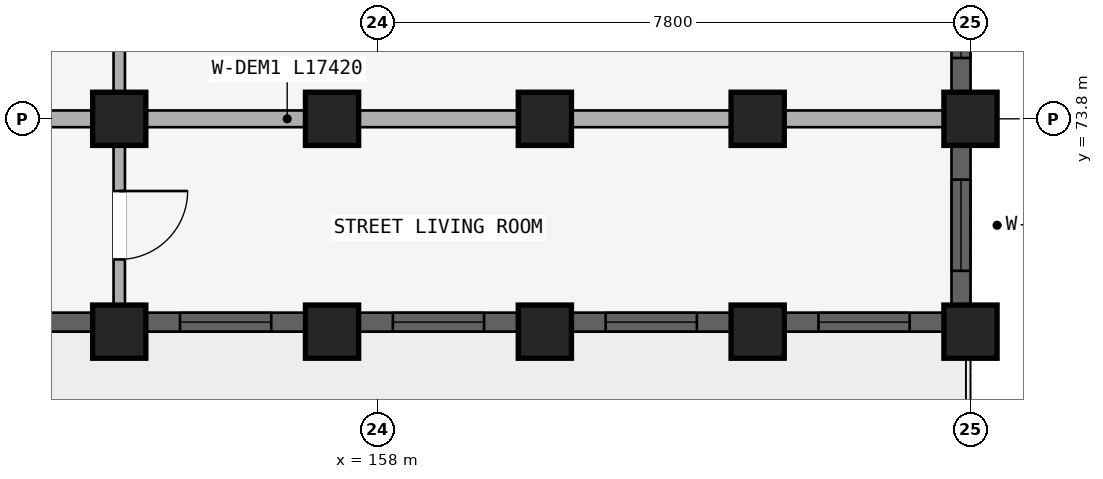
"""IFC4 building model, lengths in metres.
Left out: names, types, materials, properties, quantities, classifications, styles, units other than length and angle.
Written with IfcOpenShell. Run it as: python <this file> out.ifc"""

import sys

from ifc_helpers import new_model, si_unit, direction, frame, frame_2d, origin, origin_2d, place, context, subcontext, project, spatial, rectangle, extrude, element, fill, save


model = new_model("IFC4")
c1 = context("Model", 3, precision=1e-05, world=origin(), true_north=direction((0.0, 1.0)))
c2 = subcontext(c1, "Body", "Model", "MODEL_VIEW")
j1 = project(units=[si_unit("LENGTHUNIT", "METRE"), si_unit("PLANEANGLEUNIT", "RADIAN")], contexts=[c1])
p1 = place(None, origin())
s1 = spatial("IfcSite", under=j1, at=p1, CompositionType="ELEMENT")
p2 = place(p1, origin())
s2 = spatial("IfcBuilding", under=s1, at=p2, CompositionType="ELEMENT")
p3 = place(p2, frame((0.0, 0.0, 27.6)))
s3 = spatial("IfcBuildingStorey", under=s2, at=p3, CompositionType="ELEMENT", Elevation=27.6)
for number, where, z_axis, x_axis in (
    (1, (154.6, 73.8, 0.0), (0.0, 0.0, 1.0), (1.0, 0.0, 0.0)),
    (2, (157.4, 73.8, 0.0), (0.0, 0.0, 1.0), (1.0, 0.0, 0.0)),
    (3, (160.2, 73.8, 0.0), (0.0, 0.0, 1.0), (1.0, 0.0, 0.0)),
    (4, (163.0, 73.8, 0.0), (0.0, 0.0, 1.0), (1.0, 0.0, 0.0)),
):
    element("IfcColumn", number, at=place(p3, frame(where, z_axis=z_axis, x_axis=x_axis)), inside=s3, PredefinedType="COLUMN", context=c2, shape_type="SweptSolid", body=[
        extrude(rectangle(XDim=0.7, YDim=0.7, at=origin_2d()), origin(), (0.0, 0.0, 1.0), 2.93),
    ])
p4 = place(p3, frame((165.8, 73.8, 0.0), z_axis=(0.0, 0.0, 1.0), x_axis=(1.0, 0.0, 0.0)))
e5 = element("IfcColumn", 5, at=p4, inside=s3, PredefinedType="COLUMN", context=c2, shape_type="SweptSolid", body=[
    extrude(rectangle(XDim=0.7, YDim=0.7, at=origin_2d()), origin(), (0.0, 0.0, 1.0), 2.97),
])
for number, where, z_axis, x_axis in (
    (6, (154.6, 71.0, 0.0), (0.0, 0.0, 1.0), (1.0, 0.0, 0.0)),
    (7, (157.4, 71.0, 0.0), (0.0, 0.0, 1.0), (1.0, 0.0, 0.0)),
    (8, (160.2, 71.0, 0.0), (0.0, 0.0, 1.0), (1.0, 0.0, 0.0)),
    (9, (163.0, 71.0, 0.0), (0.0, 0.0, 1.0), (1.0, 0.0, 0.0)),
):
    element("IfcColumn", number, at=place(p3, frame(where, z_axis=z_axis, x_axis=x_axis)), inside=s3, PredefinedType="COLUMN", context=c2, shape_type="SweptSolid", body=[
        extrude(rectangle(XDim=0.7, YDim=0.7, at=origin_2d()), origin(), (0.0, 0.0, 1.0), 2.93),
    ])
p5 = place(p3, frame((165.8, 71.0, 0.0), z_axis=(0.0, 0.0, 1.0), x_axis=(1.0, 0.0, 0.0)))
e10 = element("IfcColumn", 10, at=p5, inside=s3, PredefinedType="COLUMN", context=c2, shape_type="SweptSolid", body=[
    extrude(rectangle(XDim=0.7, YDim=0.7, at=origin_2d()), origin(), (0.0, 0.0, 1.0), 2.97),
])
p6 = place(p3, frame((154.6, 76.52, 0.0), z_axis=(0.0, 0.0, 1.0), x_axis=(0.0, -1.0, 0.0)))
e11 = element("IfcWall", 11, at=p6, inside=s3, PredefinedType="PLUMBINGWALL", context=c2, shape_type="SweptSolid", body=[
    extrude(rectangle(XDim=2.64, YDim=0.15, at=frame_2d((1.32, 0.0))), origin(), (0.0, 0.0, 1.0), 2.372),
])
p7 = place(p6, frame((0.92, 0.0, 0.0)))
e12 = element("IfcOpeningElement", 12, at=p7, cuts=e11, PredefinedType="OPENING", context=c2, shape_type="SweptSolid", body=[
    extrude(rectangle(XDim=0.8, YDim=2.1, at=frame_2d((0.4, 1.05))), frame((0.0, 0.085, 0.0), z_axis=(0.0, -1.0, 0.0), x_axis=(1.0, 0.0, 0.0)), (0.0, 0.0, 1.0), 0.17),
])
p8 = place(p3, frame((154.6, 73.72, 0.0), z_axis=(0.0, 0.0, 1.0), x_axis=(0.0, -1.0, 0.0)))
e13 = element("IfcWall", 13, at=p8, inside=s3, PredefinedType="PLUMBINGWALL", context=c2, shape_type="SweptSolid", body=[
    extrude(rectangle(XDim=2.64, YDim=0.15, at=frame_2d((1.32, 0.0))), origin(), (0.0, 0.0, 1.0), 2.372),
])
p9 = place(p8, frame((0.87, 0.0, 0.0)))
e14 = element("IfcOpeningElement", 14, at=p9, cuts=e13, PredefinedType="OPENING", context=c2, shape_type="SweptSolid", body=[
    extrude(rectangle(XDim=0.9, YDim=2.1, at=frame_2d((0.45, 1.05))), frame((0.0, 0.085, 0.0), z_axis=(0.0, -1.0, 0.0), x_axis=(1.0, 0.0, 0.0)), (0.0, 0.0, 1.0), 0.17),
])
p10 = place(p3, frame((148.1, 73.8, 0.0), z_axis=(0.0, 0.0, 1.0), x_axis=(1.0, 0.0, 0.0)))
e15 = element("IfcWall", 15, at=p10, inside=s3, PredefinedType="STANDARD", context=c2, shape_type="SweptSolid", body=[
    extrude(rectangle(XDim=17.42, YDim=0.22, at=frame_2d((8.71, 0.0))), origin(), (0.0, 0.0, 1.0), 2.372),
])
p11 = place(p3, frame((165.675, 76.247, 0.0), z_axis=(0.0, 0.0, 1.0), x_axis=(0.0, -1.0, 0.0)))
e16 = element("IfcWall", 16, at=p11, inside=s3, PredefinedType="STANDARD", context=c2, shape_type="SweptSolid", body=[
    extrude(rectangle(XDim=2.093, YDim=0.25, at=frame_2d((1.046, 0.0))), origin(), (0.0, 0.0, 1.0), 2.48),
])
p12 = place(p11, frame((0.447, 0.0, 0.78)))
e17 = element("IfcOpeningElement", 17, at=p12, cuts=e16, PredefinedType="OPENING", context=c2, shape_type="SweptSolid", body=[
    extrude(rectangle(XDim=1.2, YDim=1.5, at=frame_2d((0.6, 0.75))), frame((0.0, 0.135, 0.0), z_axis=(0.0, -1.0, 0.0), x_axis=(1.0, 0.0, 0.0)), (0.0, 0.0, 1.0), 0.27),
])
p13 = place(p3, frame((165.675, 73.447, 0.0), z_axis=(0.0, 0.0, 1.0), x_axis=(0.0, -1.0, 0.0)))
e18 = element("IfcWall", 18, at=p13, inside=s3, PredefinedType="STANDARD", context=c2, shape_type="SweptSolid", body=[
    extrude(rectangle(XDim=2.093, YDim=0.25, at=frame_2d((1.046, 0.0))), origin(), (0.0, 0.0, 1.0), 2.48),
])
p14 = place(p13, frame((0.447, 0.0, 0.78)))
e19 = element("IfcOpeningElement", 19, at=p14, cuts=e18, PredefinedType="OPENING", context=c2, shape_type="SweptSolid", body=[
    extrude(rectangle(XDim=1.2, YDim=1.5, at=frame_2d((0.6, 0.75))), frame((0.0, 0.135, 0.0), z_axis=(0.0, -1.0, 0.0), x_axis=(1.0, 0.0, 0.0)), (0.0, 0.0, 1.0), 0.27),
])
p15 = place(p3, frame((148.229, 71.125, 0.0), z_axis=(0.0, 0.0, 1.0), x_axis=(1.0, 0.0, 0.0)))
e20 = element("IfcWall", 20, at=p15, inside=s3, PredefinedType="STANDARD", context=c2, shape_type="SweptSolid", body=[
    extrude(rectangle(XDim=6.018, YDim=0.25, at=frame_2d((3.009, 0.0))), origin(), (0.0, 0.0, 1.0), 2.372),
])
p16 = place(p15, frame((3.854, 0.0, 0.522)))
e21 = element("IfcOpeningElement", 21, at=p16, cuts=e20, PredefinedType="OPENING", context=c2, shape_type="SweptSolid", body=[
    extrude(rectangle(XDim=1.2, YDim=1.5, at=frame_2d((0.6, 0.75))), frame((0.0, 0.135, 0.0), z_axis=(0.0, -1.0, 0.0), x_axis=(1.0, 0.0, 0.0)), (0.0, 0.0, 1.0), 0.27),
])
p17 = place(p15, frame((1.476, 0.0, 0.0)))
e22 = element("IfcOpeningElement", 22, at=p17, cuts=e20, PredefinedType="OPENING", context=c2, shape_type="SweptSolid", body=[
    extrude(rectangle(XDim=1.26, YDim=2.15, at=frame_2d((0.63, 1.075))), frame((0.0, 0.135, 0.0), z_axis=(0.0, -1.0, 0.0), x_axis=(1.0, 0.0, 0.0)), (0.0, 0.0, 1.0), 0.27),
])
p18 = place(p3, frame((154.954, 71.125, 0.0), z_axis=(0.0, 0.0, 1.0), x_axis=(1.0, 0.0, 0.0)))
e23 = element("IfcWall", 23, at=p18, inside=s3, PredefinedType="STANDARD", context=c2, shape_type="SweptSolid", body=[
    extrude(rectangle(XDim=2.093, YDim=0.25, at=frame_2d((1.046, 0.0))), origin(), (0.0, 0.0, 1.0), 2.372),
])
p19 = place(p18, frame((0.447, 0.0, 0.672)))
e24 = element("IfcOpeningElement", 24, at=p19, cuts=e23, PredefinedType="OPENING", context=c2, shape_type="SweptSolid", body=[
    extrude(rectangle(XDim=1.2, YDim=1.5, at=frame_2d((0.6, 0.75))), frame((0.0, 0.135, 0.0), z_axis=(0.0, -1.0, 0.0), x_axis=(1.0, 0.0, 0.0)), (0.0, 0.0, 1.0), 0.27),
])
p20 = place(p3, frame((157.753, 71.125, 0.0), z_axis=(0.0, 0.0, 1.0), x_axis=(1.0, 0.0, 0.0)))
e25 = element("IfcWall", 25, at=p20, inside=s3, PredefinedType="STANDARD", context=c2, shape_type="SweptSolid", body=[
    extrude(rectangle(XDim=2.093, YDim=0.25, at=frame_2d((1.046, 0.0))), origin(), (0.0, 0.0, 1.0), 2.372),
])
p21 = place(p20, frame((0.447, 0.0, 0.672)))
e26 = element("IfcOpeningElement", 26, at=p21, cuts=e25, PredefinedType="OPENING", context=c2, shape_type="SweptSolid", body=[
    extrude(rectangle(XDim=1.2, YDim=1.5, at=frame_2d((0.6, 0.75))), frame((0.0, 0.135, 0.0), z_axis=(0.0, -1.0, 0.0), x_axis=(1.0, 0.0, 0.0)), (0.0, 0.0, 1.0), 0.27),
])
p22 = place(p3, frame((160.553, 71.125, 0.0), z_axis=(0.0, 0.0, 1.0), x_axis=(1.0, 0.0, 0.0)))
e27 = element("IfcWall", 27, at=p22, inside=s3, PredefinedType="STANDARD", context=c2, shape_type="SweptSolid", body=[
    extrude(rectangle(XDim=2.093, YDim=0.25, at=frame_2d((1.046, 0.0))), origin(), (0.0, 0.0, 1.0), 2.372),
])
p23 = place(p22, frame((0.447, 0.0, 0.672)))
e28 = element("IfcOpeningElement", 28, at=p23, cuts=e27, PredefinedType="OPENING", context=c2, shape_type="SweptSolid", body=[
    extrude(rectangle(XDim=1.2, YDim=1.5, at=frame_2d((0.6, 0.75))), frame((0.0, 0.135, 0.0), z_axis=(0.0, -1.0, 0.0), x_axis=(1.0, 0.0, 0.0)), (0.0, 0.0, 1.0), 0.27),
])
p24 = place(p3, frame((163.354, 71.125, 0.0), z_axis=(0.0, 0.0, 1.0), x_axis=(1.0, 0.0, 0.0)))
e29 = element("IfcWall", 29, at=p24, inside=s3, PredefinedType="STANDARD", context=c2, shape_type="SweptSolid", body=[
    extrude(rectangle(XDim=2.093, YDim=0.25, at=frame_2d((1.046, 0.0))), origin(), (0.0, 0.0, 1.0), 2.412),
])
p25 = place(p24, frame((0.447, 0.0, 0.712)))
e30 = element("IfcOpeningElement", 30, at=p25, cuts=e29, PredefinedType="OPENING", context=c2, shape_type="SweptSolid", body=[
    extrude(rectangle(XDim=1.2, YDim=1.5, at=frame_2d((0.6, 0.75))), frame((0.0, 0.135, 0.0), z_axis=(0.0, -1.0, 0.0), x_axis=(1.0, 0.0, 0.0)), (0.0, 0.0, 1.0), 0.27),
])
p26 = place(p12, origin())
e31 = element("IfcWindow", 31, at=p26, inside=s3, PartitioningType="SINGLE_PANEL", PredefinedType="WINDOW", context=c2, shape_type="SweptSolid", body=[
    extrude(rectangle(XDim=1.2, YDim=1.5, at=frame_2d((0.6, 0.75))), frame((0.0, 0.03, 0.0), z_axis=(0.0, -1.0, 0.0), x_axis=(1.0, 0.0, 0.0)), (0.0, 0.0, 1.0), 0.06),
])
fill(e17, e31)
p27 = place(p14, origin())
e32 = element("IfcWindow", 32, at=p27, inside=s3, PartitioningType="SINGLE_PANEL", PredefinedType="WINDOW", context=c2, shape_type="SweptSolid", body=[
    extrude(rectangle(XDim=1.2, YDim=1.5, at=frame_2d((0.6, 0.75))), frame((0.0, 0.03, 0.0), z_axis=(0.0, -1.0, 0.0), x_axis=(1.0, 0.0, 0.0)), (0.0, 0.0, 1.0), 0.06),
])
fill(e19, e32)
p28 = place(p19, origin())
e33 = element("IfcWindow", 33, at=p28, inside=s3, PartitioningType="SINGLE_PANEL", PredefinedType="WINDOW", context=c2, shape_type="SweptSolid", body=[
    extrude(rectangle(XDim=1.2, YDim=1.5, at=frame_2d((0.6, 0.75))), frame((0.0, 0.03, 0.0), z_axis=(0.0, -1.0, 0.0), x_axis=(1.0, 0.0, 0.0)), (0.0, 0.0, 1.0), 0.06),
])
fill(e24, e33)
p29 = place(p21, origin())
e34 = element("IfcWindow", 34, at=p29, inside=s3, PartitioningType="SINGLE_PANEL", PredefinedType="WINDOW", context=c2, shape_type="SweptSolid", body=[
    extrude(rectangle(XDim=1.2, YDim=1.5, at=frame_2d((0.6, 0.75))), frame((0.0, 0.03, 0.0), z_axis=(0.0, -1.0, 0.0), x_axis=(1.0, 0.0, 0.0)), (0.0, 0.0, 1.0), 0.06),
])
fill(e26, e34)
p30 = place(p23, origin())
e35 = element("IfcWindow", 35, at=p30, inside=s3, PartitioningType="SINGLE_PANEL", PredefinedType="WINDOW", context=c2, shape_type="SweptSolid", body=[
    extrude(rectangle(XDim=1.2, YDim=1.5, at=frame_2d((0.6, 0.75))), frame((0.0, 0.03, 0.0), z_axis=(0.0, -1.0, 0.0), x_axis=(1.0, 0.0, 0.0)), (0.0, 0.0, 1.0), 0.06),
])
fill(e28, e35)
p31 = place(p25, origin())
e36 = element("IfcWindow", 36, at=p31, inside=s3, PartitioningType="SINGLE_PANEL", PredefinedType="WINDOW", context=c2, shape_type="SweptSolid", body=[
    extrude(rectangle(XDim=1.2, YDim=1.5, at=frame_2d((0.6, 0.75))), frame((0.0, 0.03, 0.0), z_axis=(0.0, -1.0, 0.0), x_axis=(1.0, 0.0, 0.0)), (0.0, 0.0, 1.0), 0.06),
])
fill(e30, e36)
p32 = place(p9, origin())
e37 = element("IfcDoor", 37, at=p32, inside=s3, OperationType="SINGLE_SWING_LEFT", PredefinedType="DOOR", context=c2, shape_type="SweptSolid", body=[
    extrude(rectangle(XDim=0.9, YDim=2.1, at=frame_2d((0.45, 1.05))), frame((0.0, 0.025, 0.0), z_axis=(0.0, -1.0, 0.0), x_axis=(1.0, 0.0, 0.0)), (0.0, 0.0, 1.0), 0.05),
])
fill(e14, e37)
save(model, sys.argv[1])
